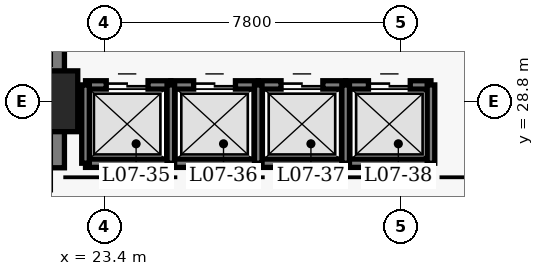
"""IFC4 building model, lengths in metres.
Left out: names, types, materials, properties, quantities, classifications, styles, units other than length and angle.
Written with IfcOpenShell. Run it as: python <this file> out.ifc"""

import sys

from ifc_helpers import new_model, si_unit, direction, frame, frame_2d, origin, origin_2d, place, context, subcontext, project, spatial, rectangle, extrude, element, fill, save


model = new_model("IFC4")
c1 = context("Model", 3, precision=1e-05, world=origin(), true_north=direction((0.0, 1.0)))
c2 = subcontext(c1, "Body", "Model", "MODEL_VIEW")
j1 = project(units=[si_unit("LENGTHUNIT", "METRE"), si_unit("PLANEANGLEUNIT", "RADIAN")], contexts=[c1])
p1 = place(None, origin())
s1 = spatial("IfcSite", under=j1, at=p1, CompositionType="ELEMENT")
p2 = place(p1, origin())
s2 = spatial("IfcBuilding", under=s1, at=p2, CompositionType="ELEMENT")
p3 = place(p2, frame((0.0, 0.0, 33.6)))
s3 = spatial("IfcBuildingStorey", under=s2, at=p3, CompositionType="ELEMENT", Elevation=33.6)
p4 = place(p3, frame((21.9, 27.05, 0.0), z_axis=(0.0, 0.0, 1.0), x_axis=(0.0, 1.0, 0.0)))
e1 = element("IfcWall", 1, at=p4, inside=s3, PredefinedType="SHEAR", context=c2, shape_type="SweptSolid", body=[
    extrude(rectangle(XDim=13.72, YDim=0.9, at=frame_2d((6.86, 0.0))), origin(), (0.0, 0.0, 1.0), 3.8),
])
p5 = place(p3, frame((21.9, 28.8, 0.0), z_axis=(0.0, 0.0, 1.0), x_axis=(1.0, 0.0, 0.0)))
e2 = element("IfcColumn", 2, at=p5, inside=s3, PredefinedType="COLUMN", context=c2, shape_type="SweptSolid", body=[
    extrude(rectangle(XDim=1.6, YDim=1.6, at=origin_2d()), origin(), (0.0, 0.0, 1.0), 3.8),
])
p6 = place(p3, frame((22.905, 29.23, 0.0), z_axis=(0.0, 0.0, 1.0), x_axis=(1.0, 0.0, 0.0)))
e3 = element("IfcWall", 3, at=p6, inside=s3, PredefinedType="SHEAR", context=c2, shape_type="SweptSolid", body=[
    extrude(rectangle(XDim=2.245, YDim=0.22, at=frame_2d((1.123, 0.0))), origin(), (0.0, 0.0, 1.0), 3.8),
])
p7 = place(p6, frame((0.545, 0.0, 0.0)))
e4 = element("IfcOpeningElement", 4, at=p7, cuts=e3, PredefinedType="OPENING", context=c2, shape_type="SweptSolid", body=[
    extrude(rectangle(XDim=1.1, YDim=2.15, at=frame_2d((0.55, 1.075))), frame((0.0, 0.12, 0.0), z_axis=(0.0, -1.0, 0.0), x_axis=(1.0, 0.0, 0.0)), (0.0, 0.0, 1.0), 0.24),
])
p8 = place(p3, frame((22.905, 27.17, 0.0), z_axis=(0.0, 0.0, 1.0), x_axis=(1.0, 0.0, 0.0)))
e5 = element("IfcWall", 5, at=p8, inside=s3, PredefinedType="SHEAR", context=c2, shape_type="SweptSolid", body=[
    extrude(rectangle(XDim=2.245, YDim=0.22, at=frame_2d((1.123, 0.0))), origin(), (0.0, 0.0, 1.0), 3.8),
])
p9 = place(p3, frame((22.905, 27.17, 0.0), z_axis=(0.0, 0.0, 1.0), x_axis=(0.0, 1.0, 0.0)))
e6 = element("IfcWall", 6, at=p9, inside=s3, PredefinedType="SHEAR", context=c2, shape_type="SweptSolid", body=[
    extrude(rectangle(XDim=2.06, YDim=0.2, at=frame_2d((1.03, 0.0))), origin(), (0.0, 0.0, 1.0), 3.8),
])
p10 = place(p3, frame((25.15, 29.23, 0.0), z_axis=(0.0, 0.0, 1.0), x_axis=(1.0, 0.0, 0.0)))
e7 = element("IfcWall", 7, at=p10, inside=s3, PredefinedType="SHEAR", context=c2, shape_type="SweptSolid", body=[
    extrude(rectangle(XDim=2.3, YDim=0.22, at=frame_2d((1.15, 0.0))), origin(), (0.0, 0.0, 1.0), 3.8),
])
p11 = place(p10, frame((0.6, 0.0, 0.0)))
e8 = element("IfcOpeningElement", 8, at=p11, cuts=e7, PredefinedType="OPENING", context=c2, shape_type="SweptSolid", body=[
    extrude(rectangle(XDim=1.1, YDim=2.15, at=frame_2d((0.55, 1.075))), frame((0.0, 0.12, 0.0), z_axis=(0.0, -1.0, 0.0), x_axis=(1.0, 0.0, 0.0)), (0.0, 0.0, 1.0), 0.24),
])
p12 = place(p3, frame((25.15, 27.17, 0.0), z_axis=(0.0, 0.0, 1.0), x_axis=(1.0, 0.0, 0.0)))
e9 = element("IfcWall", 9, at=p12, inside=s3, PredefinedType="SHEAR", context=c2, shape_type="SweptSolid", body=[
    extrude(rectangle(XDim=2.3, YDim=0.22, at=frame_2d((1.15, 0.0))), origin(), (0.0, 0.0, 1.0), 3.8),
])
p13 = place(p3, frame((25.15, 27.17, 0.0), z_axis=(0.0, 0.0, 1.0), x_axis=(0.0, 1.0, 0.0)))
e10 = element("IfcWall", 10, at=p13, inside=s3, PredefinedType="SHEAR", context=c2, shape_type="SweptSolid", body=[
    extrude(rectangle(XDim=2.06, YDim=0.2, at=frame_2d((1.03, 0.0))), origin(), (0.0, 0.0, 1.0), 3.8),
])
p14 = place(p3, frame((27.45, 29.23, 0.0), z_axis=(0.0, 0.0, 1.0), x_axis=(1.0, 0.0, 0.0)))
e11 = element("IfcWall", 11, at=p14, inside=s3, PredefinedType="SHEAR", context=c2, shape_type="SweptSolid", body=[
    extrude(rectangle(XDim=2.3, YDim=0.22, at=frame_2d((1.15, 0.0))), origin(), (0.0, 0.0, 1.0), 3.8),
])
p15 = place(p14, frame((0.6, 0.0, 0.0)))
e12 = element("IfcOpeningElement", 12, at=p15, cuts=e11, PredefinedType="OPENING", context=c2, shape_type="SweptSolid", body=[
    extrude(rectangle(XDim=1.1, YDim=2.15, at=frame_2d((0.55, 1.075))), frame((0.0, 0.12, 0.0), z_axis=(0.0, -1.0, 0.0), x_axis=(1.0, 0.0, 0.0)), (0.0, 0.0, 1.0), 0.24),
])
p16 = place(p3, frame((27.45, 27.17, 0.0), z_axis=(0.0, 0.0, 1.0), x_axis=(1.0, 0.0, 0.0)))
e13 = element("IfcWall", 13, at=p16, inside=s3, PredefinedType="SHEAR", context=c2, shape_type="SweptSolid", body=[
    extrude(rectangle(XDim=2.3, YDim=0.22, at=frame_2d((1.15, 0.0))), origin(), (0.0, 0.0, 1.0), 3.8),
])
p17 = place(p3, frame((27.45, 27.17, 0.0), z_axis=(0.0, 0.0, 1.0), x_axis=(0.0, 1.0, 0.0)))
e14 = element("IfcWall", 14, at=p17, inside=s3, PredefinedType="SHEAR", context=c2, shape_type="SweptSolid", body=[
    extrude(rectangle(XDim=2.06, YDim=0.2, at=frame_2d((1.03, 0.0))), origin(), (0.0, 0.0, 1.0), 3.8),
])
p18 = place(p3, frame((29.75, 29.23, 0.0), z_axis=(0.0, 0.0, 1.0), x_axis=(1.0, 0.0, 0.0)))
e15 = element("IfcWall", 15, at=p18, inside=s3, PredefinedType="SHEAR", context=c2, shape_type="SweptSolid", body=[
    extrude(rectangle(XDim=2.245, YDim=0.22, at=frame_2d((1.123, 0.0))), origin(), (0.0, 0.0, 1.0), 3.8),
])
p19 = place(p18, frame((0.6, 0.0, 0.0)))
e16 = element("IfcOpeningElement", 16, at=p19, cuts=e15, PredefinedType="OPENING", context=c2, shape_type="SweptSolid", body=[
    extrude(rectangle(XDim=1.1, YDim=2.15, at=frame_2d((0.55, 1.075))), frame((0.0, 0.12, 0.0), z_axis=(0.0, -1.0, 0.0), x_axis=(1.0, 0.0, 0.0)), (0.0, 0.0, 1.0), 0.24),
])
p20 = place(p3, frame((29.75, 27.17, 0.0), z_axis=(0.0, 0.0, 1.0), x_axis=(1.0, 0.0, 0.0)))
e17 = element("IfcWall", 17, at=p20, inside=s3, PredefinedType="SHEAR", context=c2, shape_type="SweptSolid", body=[
    extrude(rectangle(XDim=2.245, YDim=0.22, at=frame_2d((1.123, 0.0))), origin(), (0.0, 0.0, 1.0), 3.8),
])
for number, where, z_axis, x_axis in (
    (18, (29.75, 27.17, 0.0), (0.0, 0.0, 1.0), (0.0, 1.0, 0.0)),
    (19, (31.995, 27.17, 0.0), (0.0, 0.0, 1.0), (0.0, 1.0, 0.0)),
):
    element("IfcWall", number, at=place(p3, frame(where, z_axis=z_axis, x_axis=x_axis)), inside=s3, PredefinedType="SHEAR", context=c2, shape_type="SweptSolid", body=[
        extrude(rectangle(XDim=2.06, YDim=0.2, at=frame_2d((1.03, 0.0))), origin(), (0.0, 0.0, 1.0), 3.8),
    ])
p21 = place(p7, origin())
e20 = element("IfcDoor", 20, at=p21, inside=s3, OperationType="DOUBLE_DOOR_SLIDING", PredefinedType="DOOR", context=c2, shape_type="SweptSolid", body=[
    extrude(rectangle(XDim=1.1, YDim=2.15, at=frame_2d((0.55, 1.075))), frame((0.0, 0.025, 0.0), z_axis=(0.0, -1.0, 0.0), x_axis=(1.0, 0.0, 0.0)), (0.0, 0.0, 1.0), 0.05),
])
fill(e4, e20)
p22 = place(p11, origin())
e21 = element("IfcDoor", 21, at=p22, inside=s3, OperationType="DOUBLE_DOOR_SLIDING", PredefinedType="DOOR", context=c2, shape_type="SweptSolid", body=[
    extrude(rectangle(XDim=1.1, YDim=2.15, at=frame_2d((0.55, 1.075))), frame((0.0, 0.025, 0.0), z_axis=(0.0, -1.0, 0.0), x_axis=(1.0, 0.0, 0.0)), (0.0, 0.0, 1.0), 0.05),
])
fill(e8, e21)
p23 = place(p15, origin())
e22 = element("IfcDoor", 22, at=p23, inside=s3, OperationType="DOUBLE_DOOR_SLIDING", PredefinedType="DOOR", context=c2, shape_type="SweptSolid", body=[
    extrude(rectangle(XDim=1.1, YDim=2.15, at=frame_2d((0.55, 1.075))), frame((0.0, 0.025, 0.0), z_axis=(0.0, -1.0, 0.0), x_axis=(1.0, 0.0, 0.0)), (0.0, 0.0, 1.0), 0.05),
])
fill(e12, e22)
p24 = place(p19, origin())
e23 = element("IfcDoor", 23, at=p24, inside=s3, OperationType="DOUBLE_DOOR_SLIDING", PredefinedType="DOOR", context=c2, shape_type="SweptSolid", body=[
    extrude(rectangle(XDim=1.1, YDim=2.15, at=frame_2d((0.55, 1.075))), frame((0.0, 0.025, 0.0), z_axis=(0.0, -1.0, 0.0), x_axis=(1.0, 0.0, 0.0)), (0.0, 0.0, 1.0), 0.05),
])
fill(e16, e23)
save(model, sys.argv[1])
